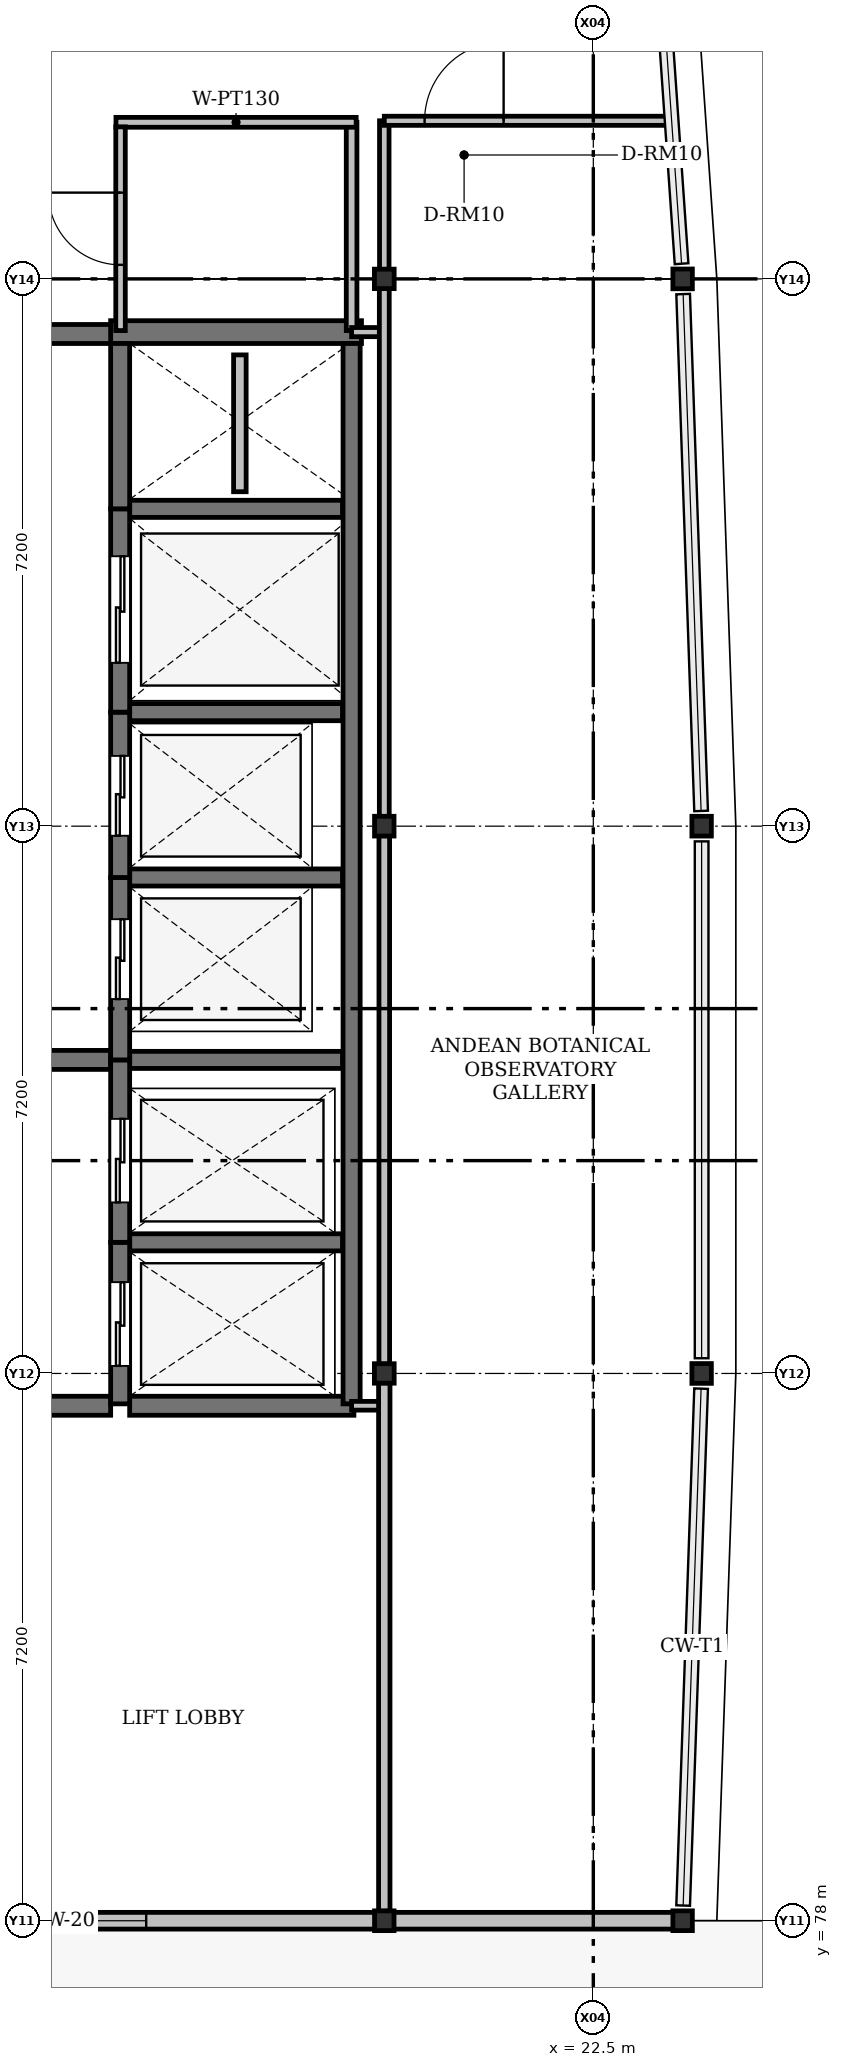
"""IFC4 building model, lengths in metres.
Left out: names, types, materials, properties, quantities, classifications, styles, units other than length and angle.
Written with IfcOpenShell. Run it as: python <this file> out.ifc"""

import sys

from ifc_helpers import new_model, si_unit, direction, frame, frame_2d, origin, origin_2d, place, context, subcontext, project, spatial, rectangle, i_section, extrude, element, fill, save


model = new_model("IFC4")
c1 = context("Model", 3, precision=1e-05, world=origin(), true_north=direction((0.0, 1.0)))
c2 = subcontext(c1, "Body", "Model", "MODEL_VIEW")
j1 = project(units=[si_unit("LENGTHUNIT", "METRE"), si_unit("PLANEANGLEUNIT", "RADIAN")], contexts=[c1])
p1 = place(None, origin())
s1 = spatial("IfcSite", under=j1, at=p1, CompositionType="ELEMENT")
p2 = place(p1, origin())
s2 = spatial("IfcBuilding", under=s1, at=p2, CompositionType="ELEMENT")
p3 = place(p2, frame((0.0, 0.0, 60.3)))
s3 = spatial("IfcBuildingStorey", under=s2, at=p3, CompositionType="ELEMENT", Elevation=60.3)
for number, where, z_axis, x_axis in (
    (1, (19.75, 78.0, 0.0), (0.0, 0.0, 1.0), (1.0, 0.0, 0.0)),
    (2, (23.675, 78.0, 0.0), (0.0, 0.0, 1.0), (1.0, 0.0, 0.0)),
    (3, (19.75, 85.2, 0.0), (0.0, 0.0, 1.0), (0.0, 1.0, 0.0)),
    (4, (23.925, 85.2, 0.0), (0.0, 0.0, 1.0), (1.0, 0.0, 0.0)),
    (5, (19.75, 92.4, 0.0), (0.0, 0.0, 1.0), (1.0, 0.0, 0.0)),
    (6, (23.925, 92.4, 0.0), (0.0, 0.0, 1.0), (1.0, 0.0, 0.0)),
    (7, (19.75, 99.6, 0.0), (0.0, 0.0, 1.0), (0.0, 1.0, 0.0)),
    (8, (23.675, 99.6, 0.0), (0.0, 0.0, 1.0), (1.0, 0.0, 0.0)),
):
    element("IfcColumn", number, at=place(p3, frame(where, z_axis=z_axis, x_axis=x_axis)), inside=s3, PredefinedType="COLUMN", context=c2, shape_type="SweptSolid", body=[
        extrude(i_section(OverallWidth=0.256, OverallDepth=0.26, WebThickness=0.011, FlangeThickness=0.017, FilletRadius=0.013, at=origin_2d()), origin(), (0.0, 0.0, 1.0), 4.2),
    ])
p4 = place(p3, frame((19.75, 78.0, 0.0), z_axis=(0.0, 0.0, 1.0), x_axis=(-1.0, 0.0, 0.0)))
e9 = element("IfcWall", 9, at=p4, inside=s3, PredefinedType="SOLIDWALL", context=c2, shape_type="SweptSolid", body=[
    extrude(rectangle(XDim=11.9, YDim=0.22, at=frame_2d((5.95, 0.0))), origin(), (0.0, 0.0, 1.0), 3.577),
])
p5 = place(p4, frame((3.133, 0.0, 0.92)))
e10 = element("IfcOpeningElement", 10, at=p5, cuts=e9, PredefinedType="OPENING", context=c2, shape_type="SweptSolid", body=[
    extrude(rectangle(XDim=2.0, YDim=1.35, at=frame_2d((1.0, 0.675))), frame((0.0, 0.11, 0.0), z_axis=(0.0, -1.0, 0.0), x_axis=(1.0, 0.0, 0.0)), (0.0, 0.0, 1.0), 0.22),
])
p6 = place(p4, frame((8.673, 0.0, 0.92)))
e11 = element("IfcOpeningElement", 11, at=p6, cuts=e9, PredefinedType="OPENING", context=c2, shape_type="SweptSolid", body=[
    extrude(rectangle(XDim=1.8, YDim=1.4, at=frame_2d((0.9, 0.7))), frame((0.0, 0.11, 0.0), z_axis=(0.0, -1.0, 0.0), x_axis=(1.0, 0.0, 0.0)), (0.0, 0.0, 1.0), 0.22),
])
p7 = place(p3, frame((23.675, 78.0, 0.0), z_axis=(0.0, 0.0, 1.0), x_axis=(-1.0, 0.0, 0.0)))
e12 = element("IfcWall", 12, at=p7, inside=s3, PredefinedType="SOLIDWALL", context=c2, shape_type="SweptSolid", body=[
    extrude(rectangle(XDim=3.925, YDim=0.22, at=frame_2d((1.962, 0.0))), origin(), (0.0, 0.0, 1.0), 3.577),
])
p8 = place(p3, frame((16.15, 98.9, 0.0), z_axis=(0.0, 0.0, 1.0), x_axis=(1.0, 0.0, 0.0)))
e13 = element("IfcWall", 13, at=p8, inside=s3, PredefinedType="SHEAR", context=c2, shape_type="SweptSolid", body=[
    extrude(rectangle(XDim=3.3, YDim=0.3, at=frame_2d((1.65, 0.0))), origin(), (0.0, 0.0, 1.0), 4.2),
])
p9 = place(p3, frame((12.12, 98.875, 0.0), z_axis=(0.0, 0.0, 1.0), x_axis=(1.0, 0.0, 0.0)))
e14 = element("IfcWall", 14, at=p9, inside=s3, PredefinedType="SHEAR", context=c2, shape_type="SweptSolid", body=[
    extrude(rectangle(XDim=4.03, YDim=0.25, at=frame_2d((2.015, 0.0))), origin(), (0.0, 0.0, 1.0), 4.2),
])
p10 = place(p9, frame((1.35, 0.0, 0.0)))
e15 = element("IfcOpeningElement", 15, at=p10, cuts=e14, PredefinedType="OPENING", context=c2, shape_type="SweptSolid", body=[
    extrude(rectangle(XDim=1.3, YDim=2.2, at=frame_2d((0.65, 1.1))), frame((0.0, 0.125, 0.0), z_axis=(0.0, -1.0, 0.0), x_axis=(1.0, 0.0, 0.0)), (0.0, 0.0, 1.0), 0.25),
])
p11 = place(p3, frame((12.12, 89.325, 0.0), z_axis=(0.0, 0.0, 1.0), x_axis=(1.0, 0.0, 0.0)))
e16 = element("IfcWall", 16, at=p11, inside=s3, PredefinedType="SHEAR", context=c2, shape_type="SweptSolid", body=[
    extrude(rectangle(XDim=4.03, YDim=0.25, at=frame_2d((2.015, 0.0))), origin(), (0.0, 0.0, 1.0), 4.2),
])
p12 = place(p11, frame((1.35, 0.0, 0.0)))
e17 = element("IfcOpeningElement", 17, at=p12, cuts=e16, PredefinedType="OPENING", context=c2, shape_type="SweptSolid", body=[
    extrude(rectangle(XDim=1.3, YDim=2.2, at=frame_2d((0.65, 1.1))), frame((0.0, 0.125, 0.0), z_axis=(0.0, -1.0, 0.0), x_axis=(1.0, 0.0, 0.0)), (0.0, 0.0, 1.0), 0.25),
])
p13 = place(p3, frame((12.12, 84.775, 0.0), z_axis=(0.0, 0.0, 1.0), x_axis=(1.0, 0.0, 0.0)))
e18 = element("IfcWall", 18, at=p13, inside=s3, PredefinedType="SHEAR", context=c2, shape_type="SweptSolid", body=[
    extrude(rectangle(XDim=4.03, YDim=0.25, at=frame_2d((2.015, 0.0))), origin(), (0.0, 0.0, 1.0), 4.2),
])
p14 = place(p13, frame((1.3, 0.0, 0.0)))
e19 = element("IfcOpeningElement", 19, at=p14, cuts=e18, PredefinedType="OPENING", context=c2, shape_type="SweptSolid", body=[
    extrude(rectangle(XDim=1.4, YDim=2.25, at=frame_2d((0.7, 1.125))), frame((0.0, 0.125, 0.0), z_axis=(0.0, -1.0, 0.0), x_axis=(1.0, 0.0, 0.0)), (0.0, 0.0, 1.0), 0.25),
])
p15 = place(p3, frame((16.4, 84.775, 0.0), z_axis=(0.0, 0.0, 1.0), x_axis=(1.0, 0.0, 0.0)))
e20 = element("IfcWall", 20, at=p15, inside=s3, PredefinedType="SHEAR", context=c2, shape_type="SweptSolid", body=[
    extrude(rectangle(XDim=2.95, YDim=0.25, at=frame_2d((1.475, 0.0))), origin(), (0.0, 0.0, 1.0), 4.2),
])
p16 = place(p3, frame((19.32, 84.8, 0.0), z_axis=(0.0, 0.0, 1.0), x_axis=(0.0, 1.0, 0.0)))
e21 = element("IfcWall", 21, at=p16, inside=s3, PredefinedType="SHEAR", context=c2, shape_type="SweptSolid", body=[
    extrude(rectangle(XDim=13.95, YDim=0.225, at=frame_2d((6.975, 0.0))), origin(), (0.0, 0.0, 1.0), 4.2),
])
for number, where, z_axis, x_axis in (
    (22, (16.4, 86.925, 0.0), (0.0, 0.0, 1.0), (1.0, 0.0, 0.0)),
    (23, (16.4, 89.325, 0.0), (0.0, 0.0, 1.0), (1.0, 0.0, 0.0)),
    (24, (16.4, 91.725, 0.0), (0.0, 0.0, 1.0), (1.0, 0.0, 0.0)),
    (25, (16.4, 93.9, 0.0), (0.0, 0.0, 1.0), (1.0, 0.0, 0.0)),
    (26, (16.4, 96.575, 0.0), (0.0, 0.0, 1.0), (1.0, 0.0, 0.0)),
):
    element("IfcWall", number, at=place(p3, frame(where, z_axis=z_axis, x_axis=x_axis)), inside=s3, PredefinedType="SHEAR", context=c2, shape_type="SweptSolid", body=[
        extrude(rectangle(XDim=2.8, YDim=0.225, at=frame_2d((1.4, 0.0))), origin(), (0.0, 0.0, 1.0), 4.2),
    ])
p17 = place(p3, frame((16.275, 84.8, 0.0), z_axis=(0.0, 0.0, 1.0), x_axis=(0.0, 1.0, 0.0)))
e27 = element("IfcWall", 27, at=p17, inside=s3, PredefinedType="SHEAR", context=c2, shape_type="SweptSolid", body=[
    extrude(rectangle(XDim=2.125, YDim=0.25, at=frame_2d((1.062, 0.0))), origin(), (0.0, 0.0, 1.0), 4.2),
])
p18 = place(p17, frame((0.5, 0.0, 0.0)))
e28 = element("IfcOpeningElement", 28, at=p18, cuts=e27, PredefinedType="OPENING", context=c2, shape_type="SweptSolid", body=[
    extrude(rectangle(XDim=1.1, YDim=2.15, at=frame_2d((0.55, 1.075))), frame((0.0, 0.125, 0.0), z_axis=(0.0, -1.0, 0.0), x_axis=(1.0, 0.0, 0.0)), (0.0, 0.0, 1.0), 0.25),
])
p19 = place(p3, frame((16.275, 86.925, 0.0), z_axis=(0.0, 0.0, 1.0), x_axis=(0.0, 1.0, 0.0)))
e29 = element("IfcWall", 29, at=p19, inside=s3, PredefinedType="SHEAR", context=c2, shape_type="SweptSolid", body=[
    extrude(rectangle(XDim=2.4, YDim=0.25, at=frame_2d((1.2, 0.0))), origin(), (0.0, 0.0, 1.0), 4.2),
])
p20 = place(p19, frame((0.525, 0.0, 0.0)))
e30 = element("IfcOpeningElement", 30, at=p20, cuts=e29, PredefinedType="OPENING", context=c2, shape_type="SweptSolid", body=[
    extrude(rectangle(XDim=1.1, YDim=2.15, at=frame_2d((0.55, 1.075))), frame((0.0, 0.125, 0.0), z_axis=(0.0, -1.0, 0.0), x_axis=(1.0, 0.0, 0.0)), (0.0, 0.0, 1.0), 0.25),
])
p21 = place(p3, frame((16.275, 89.325, 0.0), z_axis=(0.0, 0.0, 1.0), x_axis=(0.0, 1.0, 0.0)))
e31 = element("IfcWall", 31, at=p21, inside=s3, PredefinedType="SHEAR", context=c2, shape_type="SweptSolid", body=[
    extrude(rectangle(XDim=2.4, YDim=0.25, at=frame_2d((1.2, 0.0))), origin(), (0.0, 0.0, 1.0), 4.2),
])
p22 = place(p21, frame((0.8, 0.0, 0.0)))
e32 = element("IfcOpeningElement", 32, at=p22, cuts=e31, PredefinedType="OPENING", context=c2, shape_type="SweptSolid", body=[
    extrude(rectangle(XDim=1.05, YDim=2.15, at=frame_2d((0.525, 1.075))), frame((0.0, 0.125, 0.0), z_axis=(0.0, -1.0, 0.0), x_axis=(1.0, 0.0, 0.0)), (0.0, 0.0, 1.0), 0.25),
])
p23 = place(p3, frame((16.275, 91.725, 0.0), z_axis=(0.0, 0.0, 1.0), x_axis=(0.0, 1.0, 0.0)))
e33 = element("IfcWall", 33, at=p23, inside=s3, PredefinedType="SHEAR", context=c2, shape_type="SweptSolid", body=[
    extrude(rectangle(XDim=2.175, YDim=0.25, at=frame_2d((1.087, 0.0))), origin(), (0.0, 0.0, 1.0), 4.2),
])
p24 = place(p23, frame((0.55, 0.0, 0.0)))
e34 = element("IfcOpeningElement", 34, at=p24, cuts=e33, PredefinedType="OPENING", context=c2, shape_type="SweptSolid", body=[
    extrude(rectangle(XDim=1.05, YDim=2.15, at=frame_2d((0.525, 1.075))), frame((0.0, 0.125, 0.0), z_axis=(0.0, -1.0, 0.0), x_axis=(1.0, 0.0, 0.0)), (0.0, 0.0, 1.0), 0.25),
])
p25 = place(p3, frame((16.275, 93.9, 0.0), z_axis=(0.0, 0.0, 1.0), x_axis=(0.0, 1.0, 0.0)))
e35 = element("IfcWall", 35, at=p25, inside=s3, PredefinedType="SHEAR", context=c2, shape_type="SweptSolid", body=[
    extrude(rectangle(XDim=2.675, YDim=0.25, at=frame_2d((1.337, 0.0))), origin(), (0.0, 0.0, 1.0), 4.2),
])
p26 = place(p25, frame((0.65, 0.0, 0.0)))
e36 = element("IfcOpeningElement", 36, at=p26, cuts=e35, PredefinedType="OPENING", context=c2, shape_type="SweptSolid", body=[
    extrude(rectangle(XDim=1.4, YDim=2.25, at=frame_2d((0.7, 1.125))), frame((0.0, 0.125, 0.0), z_axis=(0.0, -1.0, 0.0), x_axis=(1.0, 0.0, 0.0)), (0.0, 0.0, 1.0), 0.25),
])
p27 = place(p3, frame((16.275, 96.575, 0.0), z_axis=(0.0, 0.0, 1.0), x_axis=(0.0, 1.0, 0.0)))
e37 = element("IfcWall", 37, at=p27, inside=s3, PredefinedType="SHEAR", context=c2, shape_type="SweptSolid", body=[
    extrude(rectangle(XDim=2.175, YDim=0.25, at=frame_2d((1.087, 0.0))), origin(), (0.0, 0.0, 1.0), 4.2),
])
p28 = place(p3, frame((17.85, 96.8, 0.0), z_axis=(0.0, 0.0, 1.0), x_axis=(0.0, 1.0, 0.0)))
e38 = element("IfcWall", 38, at=p28, inside=s3, PredefinedType="PLUMBINGWALL", context=c2, shape_type="SweptSolid", body=[
    extrude(rectangle(XDim=1.8, YDim=0.165, at=frame_2d((0.9, 0.0))), origin(), (0.0, 0.0, 1.0), 4.2),
])
p29 = place(p3, frame((19.32, 98.92, 0.0), z_axis=(0.0, 0.0, 1.0), x_axis=(0.0, 1.0, 0.0)))
e39 = element("IfcWall", 39, at=p29, inside=s3, PredefinedType="PARTITIONING", context=c2, shape_type="SweptSolid", body=[
    extrude(rectangle(XDim=2.74, YDim=0.14, at=frame_2d((1.37, 0.0))), origin(), (0.0, 0.0, 1.0), 3.451),
])
p30 = place(p3, frame((19.38, 101.66, 0.0), z_axis=(0.0, 0.0, 1.0), x_axis=(-1.0, 0.0, 0.0)))
e40 = element("IfcWall", 40, at=p30, inside=s3, PredefinedType="PARTITIONING", context=c2, shape_type="SweptSolid", body=[
    extrude(rectangle(XDim=3.16, YDim=0.13, at=frame_2d((1.58, 0.0))), origin(), (0.0, 0.0, 1.0), 3.95),
])
p31 = place(p3, frame((16.28, 98.92, 0.0), z_axis=(0.0, 0.0, 1.0), x_axis=(0.0, 1.0, 0.0)))
e41 = element("IfcWall", 41, at=p31, inside=s3, PredefinedType="PARTITIONING", context=c2, shape_type="SweptSolid", body=[
    extrude(rectangle(XDim=2.68, YDim=0.125, at=frame_2d((1.34, 0.0))), origin(), (0.0, 0.0, 1.0), 3.451),
])
p32 = place(p31, frame((0.865, 0.0, 0.0)))
e42 = element("IfcOpeningElement", 42, at=p32, cuts=e41, PredefinedType="OPENING", context=c2, shape_type="SweptSolid", body=[
    extrude(rectangle(XDim=0.95, YDim=2.1, at=frame_2d((0.475, 1.05))), frame((0.0, 0.062, 0.0), z_axis=(0.0, -1.0, 0.0), x_axis=(1.0, 0.0, 0.0)), (0.0, 0.0, 1.0), 0.125),
])
p33 = place(p3, frame((19.75, 98.9, 0.0), z_axis=(0.0, 0.0, 1.0), x_axis=(-1.0, 0.0, 0.0)))
e43 = element("IfcWall", 43, at=p33, inside=s3, PredefinedType="PARTITIONING", context=c2, shape_type="SweptSolid", body=[
    extrude(rectangle(XDim=0.43, YDim=0.12, at=frame_2d((0.215, 0.0))), origin(), (0.0, 0.0, 1.0), 3.527),
])
p34 = place(p3, frame((19.32, 84.775, 0.0), z_axis=(0.0, 0.0, 1.0), x_axis=(1.0, 0.0, 0.0)))
e44 = element("IfcWall", 44, at=p34, inside=s3, PredefinedType="PARTITIONING", context=c2, shape_type="SweptSolid", body=[
    extrude(rectangle(XDim=0.43, YDim=0.115, at=frame_2d((0.215, 0.0))), origin(), (0.0, 0.0, 1.0), 3.527),
])
p35 = place(p3, frame((19.75, 78.125, 0.0), z_axis=(0.0, 0.0, 1.0), x_axis=(0.0, 1.0, 0.0)))
e45 = element("IfcWall", 45, at=p35, inside=s3, PredefinedType="PARTITIONING", context=c2, shape_type="SweptSolid", body=[
    extrude(rectangle(XDim=6.952, YDim=0.15, at=frame_2d((3.476, 0.0))), origin(), (0.0, 0.0, 1.0), 3.527),
])
p36 = place(p3, frame((19.75, 85.323, 0.0), z_axis=(0.0, 0.0, 1.0), x_axis=(0.0, 1.0, 0.0)))
e46 = element("IfcWall", 46, at=p36, inside=s3, PredefinedType="PARTITIONING", context=c2, shape_type="SweptSolid", body=[
    extrude(rectangle(XDim=6.952, YDim=0.14, at=frame_2d((3.476, 0.0))), origin(), (0.0, 0.0, 1.0), 3.527),
])
p37 = place(p3, frame((19.75, 92.525, 0.0), z_axis=(0.0, 0.0, 1.0), x_axis=(0.0, 1.0, 0.0)))
e47 = element("IfcWall", 47, at=p37, inside=s3, PredefinedType="PARTITIONING", context=c2, shape_type="SweptSolid", body=[
    extrude(rectangle(XDim=6.952, YDim=0.13, at=frame_2d((3.476, 0.0))), origin(), (0.0, 0.0, 1.0), 3.527),
])
p38 = place(p3, frame((19.75, 99.723, 0.0), z_axis=(0.0, 0.0, 1.0), x_axis=(0.0, 1.0, 0.0)))
e48 = element("IfcWall", 48, at=p38, inside=s3, PredefinedType="PARTITIONING", context=c2, shape_type="SweptSolid", body=[
    extrude(rectangle(XDim=1.957, YDim=0.125, at=frame_2d((0.979, 0.0))), origin(), (0.0, 0.0, 1.0), 3.527),
])
p39 = place(p3, frame((19.75, 101.68, 0.0), z_axis=(0.0, 0.0, 1.0), x_axis=(1.0, 0.0, 0.0)))
e49 = element("IfcWall", 49, at=p39, inside=s3, PredefinedType="PARTITIONING", context=c2, shape_type="SweptSolid", body=[
    extrude(rectangle(XDim=3.79, YDim=0.12, at=frame_2d((1.895, 0.0))), origin(), (0.0, 0.0, 1.0), 3.527),
])
p40 = place(p39, frame((0.53, 0.0, 0.0)))
e50 = element("IfcOpeningElement", 50, at=p40, cuts=e49, PredefinedType="OPENING", context=c2, shape_type="SweptSolid", body=[
    extrude(rectangle(XDim=1.04, YDim=2.15, at=frame_2d((0.52, 1.075))), frame((0.0, 0.06, 0.0), z_axis=(0.0, -1.0, 0.0), x_axis=(1.0, 0.0, 0.0)), (0.0, 0.0, 1.0), 0.12),
])
p41 = place(p5, origin())
e51 = element("IfcWindow", 51, at=p41, inside=s3, PartitioningType="DOUBLE_PANEL_VERTICAL", PredefinedType="WINDOW", context=c2, shape_type="SweptSolid", body=[
    extrude(rectangle(XDim=2.0, YDim=1.35, at=frame_2d((1.0, 0.675))), frame((0.0, 0.03, 0.0), z_axis=(0.0, -1.0, 0.0), x_axis=(1.0, 0.0, 0.0)), (0.0, 0.0, 1.0), 0.06),
])
fill(e10, e51)
p42 = place(p18, origin())
e52 = element("IfcDoor", 52, at=p42, inside=s3, OperationType="SLIDING_TO_LEFT", PredefinedType="DOOR", context=c2, shape_type="SweptSolid", body=[
    extrude(rectangle(XDim=1.1, YDim=2.15, at=frame_2d((0.55, 1.075))), frame((0.0, 0.025, 0.0), z_axis=(0.0, -1.0, 0.0), x_axis=(1.0, 0.0, 0.0)), (0.0, 0.0, 1.0), 0.05),
])
fill(e28, e52)
p43 = place(p20, origin())
e53 = element("IfcDoor", 53, at=p43, inside=s3, OperationType="SLIDING_TO_LEFT", PredefinedType="DOOR", context=c2, shape_type="SweptSolid", body=[
    extrude(rectangle(XDim=1.1, YDim=2.15, at=frame_2d((0.55, 1.075))), frame((0.0, 0.025, 0.0), z_axis=(0.0, -1.0, 0.0), x_axis=(1.0, 0.0, 0.0)), (0.0, 0.0, 1.0), 0.05),
])
fill(e30, e53)
p44 = place(p22, origin())
e54 = element("IfcDoor", 54, at=p44, inside=s3, OperationType="SLIDING_TO_LEFT", PredefinedType="DOOR", context=c2, shape_type="SweptSolid", body=[
    extrude(rectangle(XDim=1.05, YDim=2.15, at=frame_2d((0.525, 1.075))), frame((0.0, 0.025, 0.0), z_axis=(0.0, -1.0, 0.0), x_axis=(1.0, 0.0, 0.0)), (0.0, 0.0, 1.0), 0.05),
])
fill(e32, e54)
p45 = place(p24, origin())
e55 = element("IfcDoor", 55, at=p45, inside=s3, OperationType="SLIDING_TO_LEFT", PredefinedType="DOOR", context=c2, shape_type="SweptSolid", body=[
    extrude(rectangle(XDim=1.05, YDim=2.15, at=frame_2d((0.525, 1.075))), frame((0.0, 0.025, 0.0), z_axis=(0.0, -1.0, 0.0), x_axis=(1.0, 0.0, 0.0)), (0.0, 0.0, 1.0), 0.05),
])
fill(e34, e55)
p46 = place(p26, origin())
e56 = element("IfcDoor", 56, at=p46, inside=s3, OperationType="SLIDING_TO_LEFT", PredefinedType="DOOR", context=c2, shape_type="SweptSolid", body=[
    extrude(rectangle(XDim=1.4, YDim=2.25, at=frame_2d((0.7, 1.125))), frame((0.0, 0.025, 0.0), z_axis=(0.0, -1.0, 0.0), x_axis=(1.0, 0.0, 0.0)), (0.0, 0.0, 1.0), 0.05),
])
fill(e36, e56)
p47 = place(p32, origin())
e57 = element("IfcDoor", 57, at=p47, inside=s3, OperationType="SINGLE_SWING_RIGHT", PredefinedType="DOOR", context=c2, shape_type="SweptSolid", body=[
    extrude(rectangle(XDim=0.95, YDim=2.1, at=frame_2d((0.475, 1.05))), frame((0.0, 0.025, 0.0), z_axis=(0.0, -1.0, 0.0), x_axis=(1.0, 0.0, 0.0)), (0.0, 0.0, 1.0), 0.05),
])
fill(e42, e57)
p48 = place(p40, origin())
e58 = element("IfcDoor", 58, at=p48, inside=s3, OperationType="SINGLE_SWING_RIGHT", PredefinedType="DOOR", context=c2, shape_type="SweptSolid", body=[
    extrude(rectangle(XDim=1.04, YDim=2.15, at=frame_2d((0.52, 1.075))), frame((0.0, 0.025, 0.0), z_axis=(0.0, -1.0, 0.0), x_axis=(1.0, 0.0, 0.0)), (0.0, 0.0, 1.0), 0.05),
])
fill(e50, e58)
save(model, sys.argv[1])
